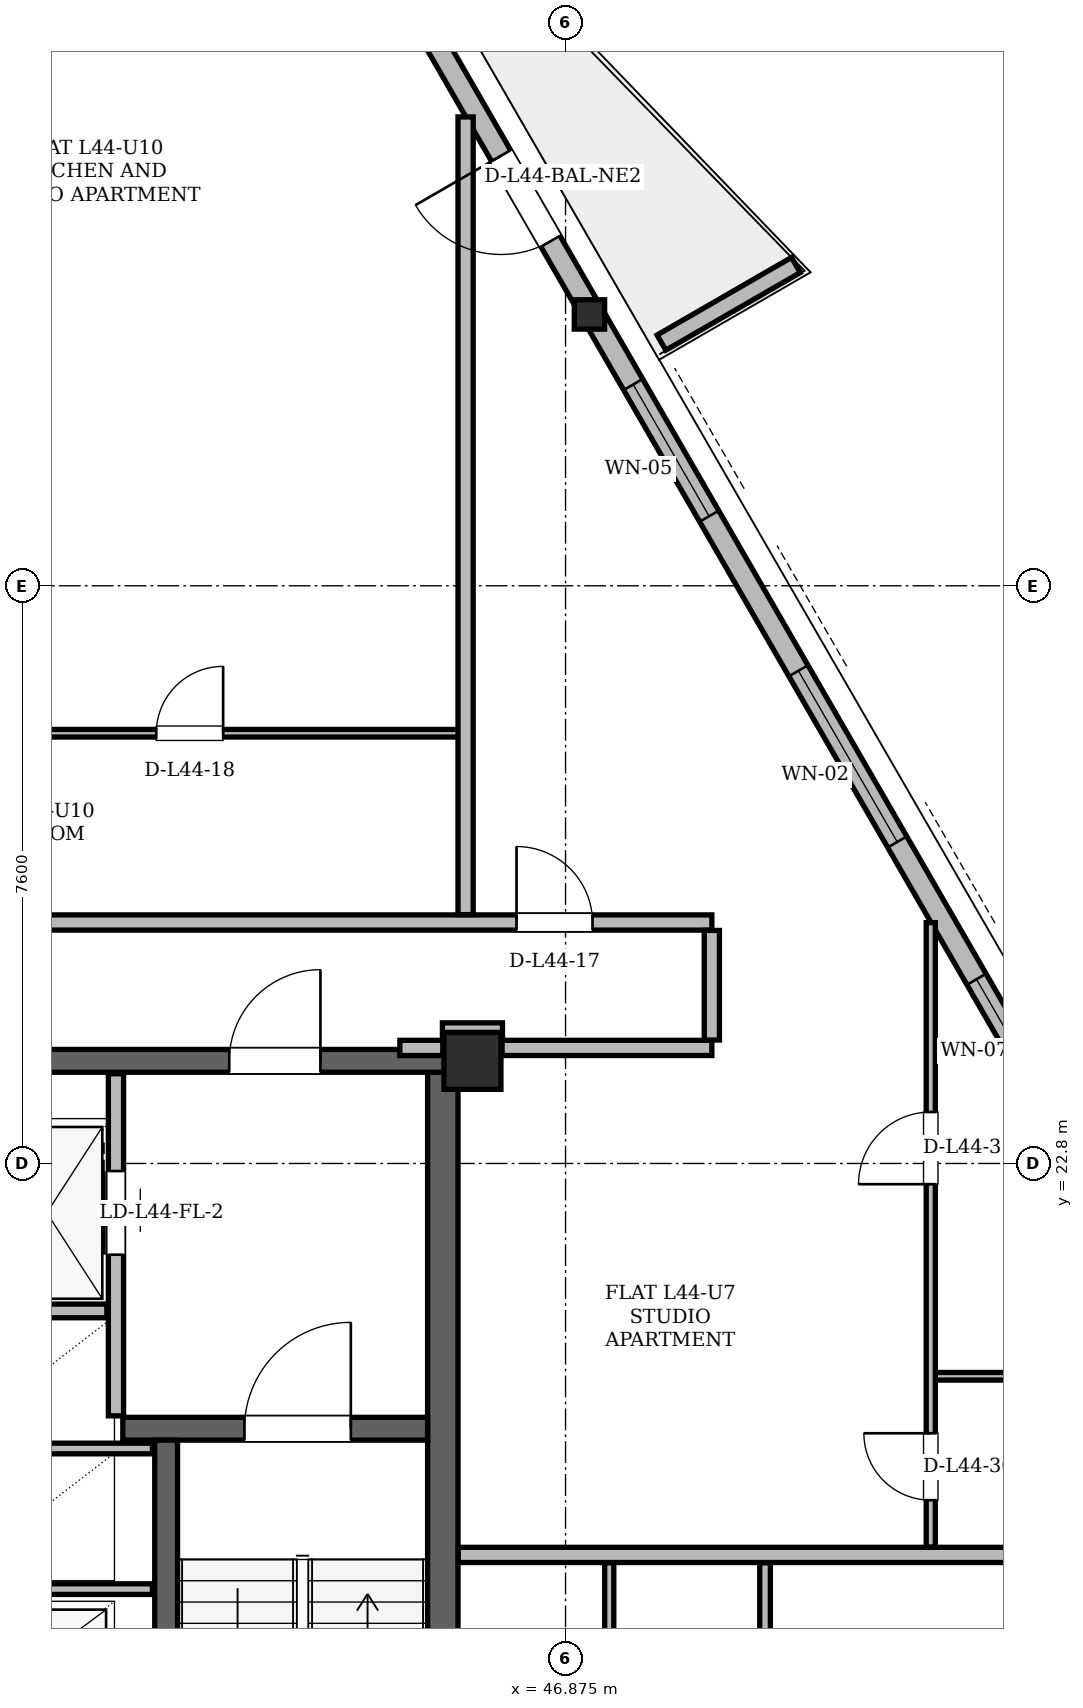
"""IFC4 building model, lengths in metres.
Left out: names, types, materials, properties, quantities, classifications, styles, units other than length and angle.
Written with IfcOpenShell. Run it as: python <this file> out.ifc"""

import sys

from ifc_helpers import new_model, si_unit, direction, frame, frame_2d, origin, origin_2d, place, context, subcontext, project, spatial, polyline, rectangle, hollow_rectangle, i_section, outline, extrude, element, fill, save


model = new_model("IFC4")
c1 = context("Model", 3, precision=1e-05, world=origin(), true_north=direction((0.0, 1.0)))
c2 = subcontext(c1, "Body", "Model", "MODEL_VIEW")
j1 = project(units=[si_unit("LENGTHUNIT", "METRE"), si_unit("PLANEANGLEUNIT", "RADIAN")], contexts=[c1])
p1 = place(None, origin())
s1 = spatial("IfcSite", under=j1, at=p1, CompositionType="ELEMENT")
p2 = place(p1, origin())
s2 = spatial("IfcBuilding", under=s1, at=p2, CompositionType="ELEMENT")
p3 = place(p2, frame((0.0, 0.0, 167.4)))
s3 = spatial("IfcBuildingStorey", under=s2, at=p3, CompositionType="ELEMENT", Elevation=167.4)
p4 = place(p3, frame((45.65, 24.15, 0.0), z_axis=(0.0, 0.0, 1.0), x_axis=(1.0, 0.0, 0.0)))
e1 = element("IfcColumn", 1, at=p4, inside=s3, PredefinedType="COLUMN", context=c2, shape_type="SweptSolid", body=[
    extrude(hollow_rectangle(XDim=0.75, YDim=0.75, WallThickness=0.06, at=origin_2d()), origin(), (0.0, 0.0, 1.0), 3.6),
])
p5 = place(p3, frame((47.225, 33.983, 0.005), z_axis=(-0.019643523819, -0.00727286176, 0.999780594658), x_axis=(0.34720866797, -0.937787897601, 0.0)))
e2 = element("IfcColumn", 2, at=p5, inside=s3, PredefinedType="COLUMN", context=c2, shape_type="SweptSolid", body=[
    extrude(i_section(OverallWidth=0.399, OverallDepth=0.386, WebThickness=0.021, FlangeThickness=0.033, at=origin_2d()), origin(), (0.0, 0.0, 1.0), 3.592),
])
p6 = place(p3, frame((45.26, 11.0, 0.0), z_axis=(0.0, 0.0, 1.0), x_axis=(0.0, 1.0, 0.0)))
e3 = element("IfcWall", 3, at=p6, inside=s3, PredefinedType="SHEAR", context=c2, shape_type="SweptSolid", body=[
    extrude(rectangle(XDim=13.3, YDim=0.4, at=frame_2d((6.65, 0.0))), origin(), (0.0, 0.0, 1.0), 3.38),
])
p7 = place(p3, frame((29.65, 24.15, 0.0), z_axis=(0.0, 0.0, 1.0), x_axis=(1.0, 0.0, 0.0)))
e4 = element("IfcWall", 4, at=p7, inside=s3, PredefinedType="SHEAR", context=c2, shape_type="SweptSolid", body=[
    extrude(rectangle(XDim=15.7, YDim=0.3, at=frame_2d((7.85, 0.0))), origin(), (0.0, 0.0, 1.0), 3.38),
])
p8 = place(p7, frame((1.7, 0.0, 0.0)))
e5 = element("IfcOpeningElement", 5, at=p8, cuts=e4, PredefinedType="OPENING", context=c2, shape_type="SweptSolid", body=[
    extrude(rectangle(XDim=1.2, YDim=2.2, at=frame_2d((0.6, 1.1))), frame((0.0, 0.15, 0.0), z_axis=(0.0, -1.0, 0.0), x_axis=(1.0, 0.0, 0.0)), (0.0, 0.0, 1.0), 0.3),
])
p9 = place(p7, frame((12.8, 0.0, 0.0)))
e6 = element("IfcOpeningElement", 6, at=p9, cuts=e4, PredefinedType="OPENING", context=c2, shape_type="SweptSolid", body=[
    extrude(rectangle(XDim=1.2, YDim=2.2, at=frame_2d((0.6, 1.1))), frame((0.0, 0.15, 0.0), z_axis=(0.0, -1.0, 0.0), x_axis=(1.0, 0.0, 0.0)), (0.0, 0.0, 1.0), 0.3),
])
p10 = place(p7, frame((6.55, 0.0, 0.0)))
e7 = element("IfcOpeningElement", 7, at=p10, cuts=e4, PredefinedType="OPENING", context=c2, shape_type="SweptSolid", body=[
    extrude(rectangle(XDim=0.9, YDim=2.05, at=frame_2d((0.45, 1.025))), frame((0.0, 0.15, 0.0), z_axis=(0.0, -1.0, 0.0), x_axis=(1.0, 0.0, 0.0)), (0.0, 0.0, 1.0), 0.3),
])
p11 = place(p7, frame((8.45, 0.0, 0.0)))
e8 = element("IfcOpeningElement", 8, at=p11, cuts=e4, PredefinedType="OPENING", context=c2, shape_type="SweptSolid", body=[
    extrude(rectangle(XDim=0.9, YDim=2.05, at=frame_2d((0.45, 1.025))), frame((0.0, 0.15, 0.0), z_axis=(0.0, -1.0, 0.0), x_axis=(1.0, 0.0, 0.0)), (0.0, 0.0, 1.0), 0.3),
])
p12 = place(p3, frame((41.05, 19.31, 0.0), z_axis=(0.0, 0.0, 1.0), x_axis=(1.0, 0.0, 0.0)))
e9 = element("IfcWall", 9, at=p12, inside=s3, PredefinedType="SHEAR", context=c2, shape_type="SweptSolid", body=[
    extrude(rectangle(XDim=4.01, YDim=0.3, at=frame_2d((2.005, 0.0))), origin(), (0.0, 0.0, 1.0), 3.38),
])
p13 = place(p12, frame((1.6, 0.0, 0.0)))
e10 = element("IfcOpeningElement", 10, at=p13, cuts=e9, PredefinedType="OPENING", context=c2, shape_type="SweptSolid", body=[
    extrude(rectangle(XDim=1.4, YDim=2.2, at=frame_2d((0.7, 1.1))), frame((0.0, 0.15, 0.0), z_axis=(0.0, -1.0, 0.0), x_axis=(1.0, 0.0, 0.0)), (0.0, 0.0, 1.0), 0.3),
])
p14 = place(p3, frame((41.62, 11.54, 0.0), z_axis=(0.0, 0.0, 1.0), x_axis=(0.0, 1.0, 0.0)))
e11 = element("IfcWall", 11, at=p14, inside=s3, PredefinedType="SHEAR", context=c2, shape_type="SweptSolid", body=[
    extrude(rectangle(XDim=7.62, YDim=0.3, at=frame_2d((3.81, 0.0))), origin(), (0.0, 0.0, 1.0), 3.38),
])
p15 = place(p3, frame((59.756, 12.279, 0.0), z_axis=(0.0, 0.0, 1.0), x_axis=(-0.499997523705, 0.86602683347, 0.0)))
e12 = element("IfcWall", 12, at=p15, inside=s3, PredefinedType="SOLIDWALL", context=c2, shape_type="SweptSolid", body=[
    extrude(rectangle(XDim=35.802, YDim=0.29, at=frame_2d((17.901, 0.0))), origin(), (0.0, 0.0, 1.0), 2.6),
])
p16 = place(p15, frame((6.579, 0.0, 0.0)))
e13 = element("IfcOpeningElement", 13, at=p16, cuts=e12, PredefinedType="OPENING", context=c2, shape_type="SweptSolid", body=[
    extrude(rectangle(XDim=1.5, YDim=2.2, at=frame_2d((0.75, 1.1))), frame((0.0, 0.145, 0.0), z_axis=(0.0, -1.0, 0.0), x_axis=(1.0, 0.0, 0.0)), (0.0, 0.0, 1.0), 0.29),
])
p17 = place(p15, frame((26.158, 0.0, 0.0)))
e14 = element("IfcOpeningElement", 14, at=p17, cuts=e12, PredefinedType="OPENING", context=c2, shape_type="SweptSolid", body=[
    extrude(rectangle(XDim=1.3, YDim=2.2, at=frame_2d((0.65, 1.1))), frame((0.0, 0.145, 0.0), z_axis=(0.0, -1.0, 0.0), x_axis=(1.0, 0.0, 0.0)), (0.0, 0.0, 1.0), 0.29),
])
p18 = place(p15, frame((1.25, 0.0, 0.85)))
e15 = element("IfcOpeningElement", 15, at=p18, cuts=e12, PredefinedType="OPENING", context=c2, shape_type="SweptSolid", body=[
    extrude(rectangle(XDim=1.2, YDim=1.48, at=frame_2d((0.6, 0.74))), frame((0.0, 0.145, 0.0), z_axis=(0.0, -1.0, 0.0), x_axis=(1.0, 0.0, 0.0)), (0.0, 0.0, 1.0), 0.29),
])
p19 = place(p15, frame((17.033, 0.0, 0.85)))
e16 = element("IfcOpeningElement", 16, at=p19, cuts=e12, PredefinedType="OPENING", context=c2, shape_type="SweptSolid", body=[
    extrude(rectangle(XDim=2.6, YDim=1.64, at=frame_2d((1.3, 0.82))), frame((0.0, 0.145, 0.0), z_axis=(0.0, -1.0, 0.0), x_axis=(1.0, 0.0, 0.0)), (0.0, 0.0, 1.0), 0.29),
])
p20 = place(p15, frame((21.982, 0.0, 0.85)))
e17 = element("IfcOpeningElement", 17, at=p20, cuts=e12, PredefinedType="OPENING", context=c2, shape_type="SweptSolid", body=[
    extrude(rectangle(XDim=2.0, YDim=1.64, at=frame_2d((1.0, 0.82))), frame((0.0, 0.145, 0.0), z_axis=(0.0, -1.0, 0.0), x_axis=(1.0, 0.0, 0.0)), (0.0, 0.0, 1.0), 0.29),
])
p21 = place(p15, frame((13.347, 0.0, 0.85)))
e18 = element("IfcOpeningElement", 18, at=p21, cuts=e12, PredefinedType="OPENING", context=c2, shape_type="SweptSolid", body=[
    extrude(rectangle(XDim=1.6, YDim=1.64, at=frame_2d((0.8, 0.82))), frame((0.0, 0.145, 0.0), z_axis=(0.0, -1.0, 0.0), x_axis=(1.0, 0.0, 0.0)), (0.0, 0.0, 1.0), 0.29),
])
p22 = place(p15, frame((31.619, 0.0, 0.85)))
e19 = element("IfcOpeningElement", 19, at=p22, cuts=e12, PredefinedType="OPENING", context=c2, shape_type="SweptSolid", body=[
    extrude(rectangle(XDim=2.6, YDim=1.64, at=frame_2d((1.3, 0.82))), frame((0.0, 0.145, 0.0), z_axis=(0.0, -1.0, 0.0), x_axis=(1.0, 0.0, 0.0)), (0.0, 0.0, 1.0), 0.29),
])
p23 = place(p3, frame((48.137, 33.599, 0.0), z_axis=(0.0, 0.0, 1.0), x_axis=(0.866042246008, 0.499970827278, 0.0)))
e20 = element("IfcWall", 20, at=p23, inside=s3, PredefinedType="PARAPET", context=c2, shape_type="SweptSolid", body=[
    extrude(outline(polyline([(0.0, 0.0), (2.042, 0.0), (2.042, 1.1), (0.0, 1.32), (0.0, 0.0)])), frame((0.0, 0.115, 0.0), z_axis=(0.0, -1.0, 0.0), x_axis=(1.0, 0.0, 0.0)), (0.0, 0.0, 1.0), 0.23),
])
p24 = place(p3, frame((40.96, 19.48, 0.0), z_axis=(0.0, 0.0, 1.0), x_axis=(0.0, 1.0, 0.0)))
e21 = element("IfcWall", 21, at=p24, inside=s3, PredefinedType="PARTITIONING", context=c2, shape_type="SweptSolid", body=[
    extrude(rectangle(XDim=4.5, YDim=0.2, at=frame_2d((2.25, 0.0))), origin(), (0.0, 0.0, 1.0), 3.38),
])
p25 = place(p24, frame((2.12, 0.0, 0.0)))
e22 = element("IfcOpeningElement", 22, at=p25, cuts=e21, PredefinedType="OPENING", context=c2, shape_type="SweptSolid", body=[
    extrude(rectangle(XDim=1.1, YDim=2.2, at=frame_2d((0.55, 1.1))), frame((0.0, 0.1, 0.0), z_axis=(0.0, -1.0, 0.0), x_axis=(1.0, 0.0, 0.0)), (0.0, 0.0, 1.0), 0.2),
])
p26 = place(p3, frame((39.26, 20.86, 0.0), z_axis=(0.0, 0.0, 1.0), x_axis=(1.0, 0.0, 0.0)))
e23 = element("IfcWall", 23, at=p26, inside=s3, PredefinedType="PARTITIONING", context=c2, shape_type="SweptSolid", body=[
    extrude(rectangle(XDim=1.58, YDim=0.18, at=frame_2d((0.79, 0.0))), origin(), (0.0, 0.0, 1.0), 3.38),
])
for number, where, z_axis, x_axis in (
    (24, (38.78, 17.2, 0.0), (0.0, 0.0, 1.0), (1.0, 0.0, 0.0)),
    (25, (38.78, 19.05, 0.0), (0.0, 0.0, 1.0), (1.0, 0.0, 0.0)),
):
    element("IfcWall", number, at=place(p3, frame(where, z_axis=z_axis, x_axis=x_axis)), inside=s3, PredefinedType="PARTITIONING", context=c2, shape_type="SweptSolid", body=[
        extrude(rectangle(XDim=2.66, YDim=0.14, at=frame_2d((1.33, 0.0))), origin(), (0.0, 0.0, 1.0), 3.38),
    ])
p27 = place(p3, frame((45.464, 17.65, 0.0), z_axis=(0.0, 0.0, 1.0), x_axis=(1.0, 0.0, 0.0)))
e26 = element("IfcWall", 26, at=p27, inside=s3, PredefinedType="PARTITIONING", context=c2, shape_type="SweptSolid", body=[
    extrude(rectangle(XDim=11.018, YDim=0.2, at=frame_2d((5.509, 0.0))), origin(), (0.0, 0.0, 1.0), 2.52),
])
p28 = place(p3, frame((51.676, 20.0, 0.0), z_axis=(0.0, 0.0, 1.0), x_axis=(1.0, 0.0, 0.0)))
e27 = element("IfcWall", 27, at=p28, inside=s3, PredefinedType="PARTITIONING", context=c2, shape_type="SweptSolid", body=[
    extrude(rectangle(XDim=3.45, YDim=0.1, at=frame_2d((1.725, 0.0))), origin(), (0.0, 0.0, 1.0), 3.38),
])
p29 = place(p3, frame((44.695, 24.32, 0.0), z_axis=(0.0, 0.0, 1.0), x_axis=(1.0, 0.0, 0.0)))
e28 = element("IfcWall", 28, at=p29, inside=s3, PredefinedType="PARTITIONING", context=c2, shape_type="SweptSolid", body=[
    extrude(rectangle(XDim=0.565, YDim=0.2, at=frame_2d((0.282, 0.0))), origin(), (0.0, 0.0, 1.0), 2.52),
])
p30 = place(p3, frame((46.04, 24.32, 0.0), z_axis=(0.0, 0.0, 1.0), x_axis=(1.0, 0.0, 0.0)))
e29 = element("IfcWall", 29, at=p30, inside=s3, PredefinedType="PARTITIONING", context=c2, shape_type="SweptSolid", body=[
    extrude(rectangle(XDim=2.76, YDim=0.2, at=frame_2d((1.38, 0.0))), origin(), (0.0, 0.0, 1.0), 3.38),
])
p31 = place(p3, frame((45.255, 24.55, 0.0), z_axis=(0.0, 0.0, 1.0), x_axis=(1.0, 0.0, 0.0)))
e30 = element("IfcWall", 30, at=p31, inside=s3, PredefinedType="PARTITIONING", context=c2, shape_type="SweptSolid", body=[
    extrude(rectangle(XDim=0.79, YDim=0.2, at=frame_2d((0.395, 0.0))), origin(), (0.0, 0.0, 1.0), 2.842),
])
p32 = place(p3, frame((38.3, 25.97, 0.0), z_axis=(0.0, 0.0, 1.0), x_axis=(1.0, 0.0, 0.0)))
e31 = element("IfcWall", 31, at=p32, inside=s3, PredefinedType="PARTITIONING", context=c2, shape_type="SweptSolid", body=[
    extrude(rectangle(XDim=10.5, YDim=0.2, at=frame_2d((5.25, 0.0))), origin(), (0.0, 0.0, 1.0), 2.842),
])
p33 = place(p32, frame((7.93, 0.0, 0.0)))
e32 = element("IfcOpeningElement", 32, at=p33, cuts=e31, PredefinedType="OPENING", context=c2, shape_type="SweptSolid", body=[
    extrude(rectangle(XDim=1.0, YDim=2.18, at=frame_2d((0.5, 1.09))), frame((0.0, 0.1, 0.0), z_axis=(0.0, -1.0, 0.0), x_axis=(1.0, 0.0, 0.0)), (0.0, 0.0, 1.0), 0.2),
])
p34 = place(p3, frame((38.218, 28.46, 0.0), z_axis=(0.0, 0.0, 1.0), x_axis=(1.0, 0.0, 0.0)))
e33 = element("IfcWall", 33, at=p34, inside=s3, PredefinedType="PARTITIONING", context=c2, shape_type="SweptSolid", body=[
    extrude(rectangle(XDim=7.424, YDim=0.1, at=frame_2d((3.712, 0.0))), origin(), (0.0, 0.0, 1.0), 3.38),
])
p35 = place(p34, frame((3.272, 0.0, 0.0)))
e34 = element("IfcOpeningElement", 34, at=p35, cuts=e33, PredefinedType="OPENING", context=c2, shape_type="SweptSolid", body=[
    extrude(rectangle(XDim=0.88, YDim=2.08, at=frame_2d((0.44, 1.04))), frame((0.0, 0.05, 0.0), z_axis=(0.0, -1.0, 0.0), x_axis=(1.0, 0.0, 0.0)), (0.0, 0.0, 1.0), 0.1),
])
p36 = place(p3, frame((45.56, 26.074, 0.0), z_axis=(0.0, 0.0, 1.0), x_axis=(0.0, 1.0, 0.0)))
e35 = element("IfcWall", 35, at=p36, inside=s3, PredefinedType="PARTITIONING", context=c2, shape_type="SweptSolid", body=[
    extrude(rectangle(XDim=10.494, YDim=0.2, at=frame_2d((5.247, 0.0))), origin(), (0.0, 0.0, 1.0), 2.6),
])
p37 = place(p3, frame((47.45, 13.124, 0.0), z_axis=(0.0, 0.0, 1.0), x_axis=(0.0, 1.0, 0.0)))
e36 = element("IfcWall", 36, at=p37, inside=s3, PredefinedType="PARTITIONING", context=c2, shape_type="SweptSolid", body=[
    extrude(rectangle(XDim=4.422, YDim=0.12, at=frame_2d((2.211, 0.0))), origin(), (0.0, 0.0, 1.0), 3.38),
])
p38 = place(p3, frame((48.8, 24.424, 0.0), z_axis=(0.0, 0.0, 1.0), x_axis=(0.0, 1.0, 0.0)))
e37 = element("IfcWall", 37, at=p38, inside=s3, PredefinedType="PARTITIONING", context=c2, shape_type="SweptSolid", body=[
    extrude(rectangle(XDim=1.442, YDim=0.2, at=frame_2d((0.721, 0.0))), origin(), (0.0, 0.0, 1.0), 3.38),
])
p39 = place(p3, frame((49.5, 13.124, 0.0), z_axis=(0.0, 0.0, 1.0), x_axis=(0.0, 1.0, 0.0)))
e38 = element("IfcWall", 38, at=p39, inside=s3, PredefinedType="PARTITIONING", context=c2, shape_type="SweptSolid", body=[
    extrude(rectangle(XDim=4.422, YDim=0.14, at=frame_2d((2.211, 0.0))), origin(), (0.0, 0.0, 1.0), 3.38),
])
p40 = place(p3, frame((51.68, 17.754, 0.0), z_axis=(0.0, 0.0, 1.0), x_axis=(0.0, 1.0, 0.0)))
e39 = element("IfcWall", 39, at=p40, inside=s3, PredefinedType="PARTITIONING", context=c2, shape_type="SweptSolid", body=[
    extrude(rectangle(XDim=8.214, YDim=0.12, at=frame_2d((4.107, 0.0))), origin(), (0.0, 0.0, 1.0), 3.38),
])
p41 = place(p40, frame((0.616, 0.0, 0.0)))
e40 = element("IfcOpeningElement", 40, at=p41, cuts=e39, PredefinedType="OPENING", context=c2, shape_type="SweptSolid", body=[
    extrude(rectangle(XDim=0.88, YDim=2.08, at=frame_2d((0.44, 1.04))), frame((0.0, 0.06, 0.0), z_axis=(0.0, -1.0, 0.0), x_axis=(1.0, 0.0, 0.0)), (0.0, 0.0, 1.0), 0.12),
])
p42 = place(p40, frame((4.773, 0.0, 0.0)))
e41 = element("IfcOpeningElement", 41, at=p42, cuts=e39, PredefinedType="OPENING", context=c2, shape_type="SweptSolid", body=[
    extrude(rectangle(XDim=0.95, YDim=2.1, at=frame_2d((0.475, 1.05))), frame((0.0, 0.06, 0.0), z_axis=(0.0, -1.0, 0.0), x_axis=(1.0, 0.0, 0.0)), (0.0, 0.0, 1.0), 0.12),
])
p43 = place(p17, origin())
e42 = element("IfcDoor", 42, at=p43, inside=s3, OperationType="SINGLE_SWING_RIGHT", PredefinedType="DOOR", context=c2, shape_type="SweptSolid", body=[
    extrude(rectangle(XDim=1.3, YDim=2.2, at=frame_2d((0.65, 1.1))), frame((0.0, 0.025, 0.0), z_axis=(0.0, -1.0, 0.0), x_axis=(1.0, 0.0, 0.0)), (0.0, 0.0, 1.0), 0.05),
])
fill(e14, e42)
p44 = place(p19, origin())
e43 = element("IfcWindow", 43, at=p44, inside=s3, PartitioningType="SINGLE_PANEL", PredefinedType="WINDOW", context=c2, shape_type="SweptSolid", body=[
    extrude(rectangle(XDim=2.6, YDim=1.64, at=frame_2d((1.3, 0.82))), frame((0.0, 0.03, 0.0), z_axis=(0.0, -1.0, 0.0), x_axis=(1.0, 0.0, 0.0)), (0.0, 0.0, 1.0), 0.06),
])
fill(e16, e43)
p45 = place(p20, origin())
e44 = element("IfcWindow", 44, at=p45, inside=s3, PartitioningType="SINGLE_PANEL", PredefinedType="WINDOW", context=c2, shape_type="SweptSolid", body=[
    extrude(rectangle(XDim=2.0, YDim=1.64, at=frame_2d((1.0, 0.82))), frame((0.0, 0.03, 0.0), z_axis=(0.0, -1.0, 0.0), x_axis=(1.0, 0.0, 0.0)), (0.0, 0.0, 1.0), 0.06),
])
fill(e17, e44)
p46 = place(p21, origin())
e45 = element("IfcWindow", 45, at=p46, inside=s3, PartitioningType="SINGLE_PANEL", PredefinedType="WINDOW", context=c2, shape_type="SweptSolid", body=[
    extrude(rectangle(XDim=1.6, YDim=1.64, at=frame_2d((0.8, 0.82))), frame((0.0, 0.03, 0.0), z_axis=(0.0, -1.0, 0.0), x_axis=(1.0, 0.0, 0.0)), (0.0, 0.0, 1.0), 0.06),
])
fill(e18, e45)
p47 = place(p25, origin())
e46 = element("IfcDoor", 46, at=p47, inside=s3, OperationType="SLIDING_TO_RIGHT", PredefinedType="DOOR", context=c2, shape_type="SweptSolid", body=[
    extrude(rectangle(XDim=1.1, YDim=2.2, at=frame_2d((0.55, 1.1))), frame((0.0, 0.025, 0.0), z_axis=(0.0, -1.0, 0.0), x_axis=(1.0, 0.0, 0.0)), (0.0, 0.0, 1.0), 0.05),
])
fill(e22, e46)
p48 = place(p13, origin())
e47 = element("IfcDoor", 47, at=p48, inside=s3, OperationType="SINGLE_SWING_RIGHT", PredefinedType="DOOR", context=c2, shape_type="SweptSolid", body=[
    extrude(rectangle(XDim=1.4, YDim=2.2, at=frame_2d((0.7, 1.1))), frame((0.0, 0.025, 0.0), z_axis=(0.0, -1.0, 0.0), x_axis=(1.0, 0.0, 0.0)), (0.0, 0.0, 1.0), 0.05),
])
fill(e10, e47)
p49 = place(p9, origin())
e48 = element("IfcDoor", 48, at=p49, inside=s3, OperationType="SINGLE_SWING_RIGHT", PredefinedType="DOOR", context=c2, shape_type="SweptSolid", body=[
    extrude(rectangle(XDim=1.2, YDim=2.2, at=frame_2d((0.6, 1.1))), frame((0.0, 0.025, 0.0), z_axis=(0.0, -1.0, 0.0), x_axis=(1.0, 0.0, 0.0)), (0.0, 0.0, 1.0), 0.05),
])
fill(e6, e48)
p50 = place(p33, origin())
e49 = element("IfcDoor", 49, at=p50, inside=s3, OperationType="SINGLE_SWING_LEFT", PredefinedType="DOOR", context=c2, shape_type="SweptSolid", body=[
    extrude(rectangle(XDim=1.0, YDim=2.18, at=frame_2d((0.5, 1.09))), frame((0.0, 0.025, 0.0), z_axis=(0.0, -1.0, 0.0), x_axis=(1.0, 0.0, 0.0)), (0.0, 0.0, 1.0), 0.05),
])
fill(e32, e49)
p51 = place(p35, origin())
e50 = element("IfcDoor", 50, at=p51, inside=s3, OperationType="SINGLE_SWING_RIGHT", PredefinedType="DOOR", context=c2, shape_type="SweptSolid", body=[
    extrude(rectangle(XDim=0.88, YDim=2.08, at=frame_2d((0.44, 1.04))), frame((0.0, 0.025, 0.0), z_axis=(0.0, -1.0, 0.0), x_axis=(1.0, 0.0, 0.0)), (0.0, 0.0, 1.0), 0.05),
])
fill(e34, e50)
p52 = place(p41, origin())
e51 = element("IfcDoor", 51, at=p52, inside=s3, OperationType="SINGLE_SWING_RIGHT", PredefinedType="DOOR", context=c2, shape_type="SweptSolid", body=[
    extrude(rectangle(XDim=0.88, YDim=2.08, at=frame_2d((0.44, 1.04))), frame((0.0, 0.025, 0.0), z_axis=(0.0, -1.0, 0.0), x_axis=(1.0, 0.0, 0.0)), (0.0, 0.0, 1.0), 0.05),
])
fill(e40, e51)
p53 = place(p42, origin())
e52 = element("IfcDoor", 52, at=p53, inside=s3, OperationType="SINGLE_SWING_LEFT", PredefinedType="DOOR", context=c2, shape_type="SweptSolid", body=[
    extrude(rectangle(XDim=0.95, YDim=2.1, at=frame_2d((0.475, 1.05))), frame((0.0, 0.025, 0.0), z_axis=(0.0, -1.0, 0.0), x_axis=(1.0, 0.0, 0.0)), (0.0, 0.0, 1.0), 0.05),
])
fill(e41, e52)
save(model, sys.argv[1])
